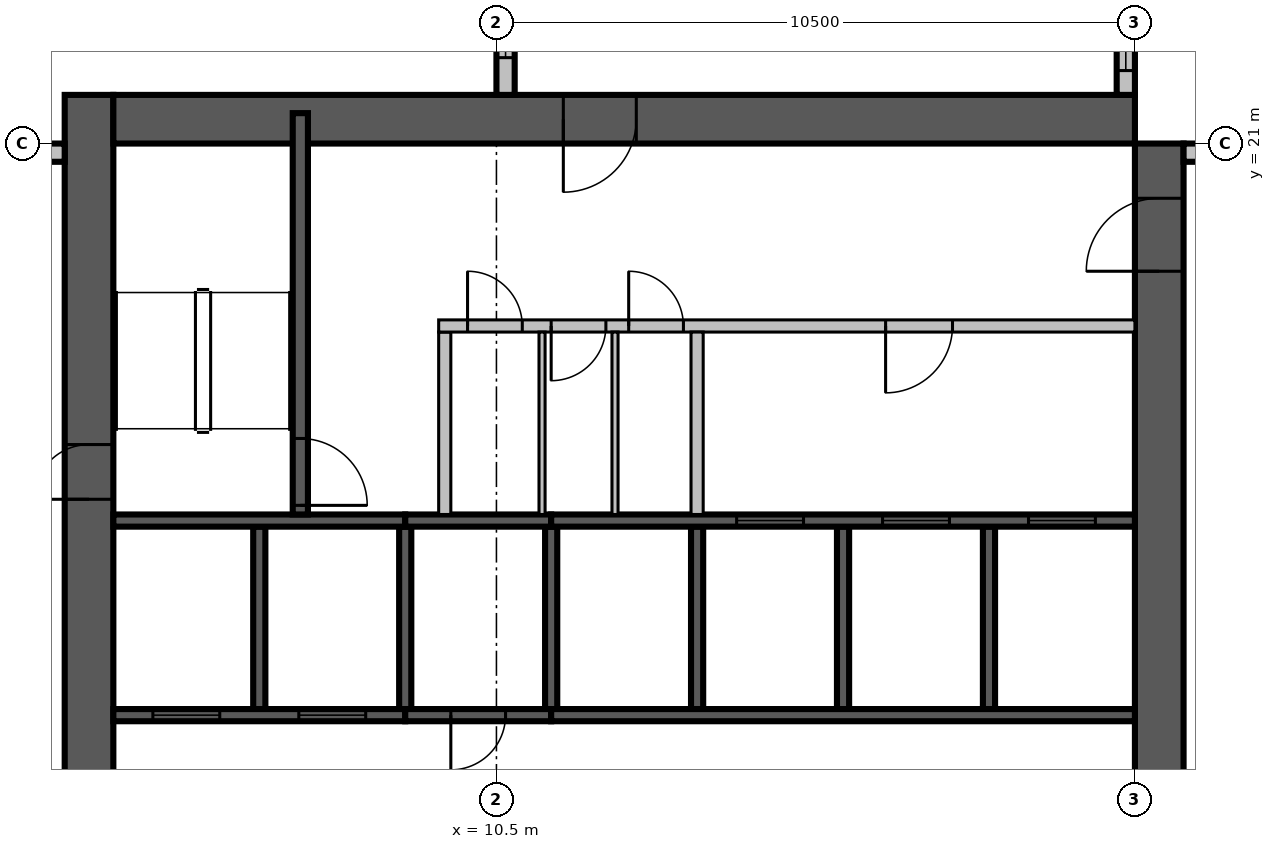
"""IFC4 building model, lengths in metres.
Left out: names, types, materials, properties, quantities, classifications, styles, units other than length and angle.
Written with IfcOpenShell. Run it as: python <this file> out.ifc"""

import sys

from ifc_helpers import new_model, si_unit, direction, frame, frame_2d, origin, place, context, subcontext, project, spatial, rectangle, extrude, source, transform, mapped, element, fill, save


model = new_model("IFC4")
c1 = context("Model", 3, precision=1e-05, world=origin(), true_north=direction((0.0, 1.0)))
c2 = subcontext(c1, "Body", "Model", "MODEL_VIEW")
j1 = project(units=[si_unit("LENGTHUNIT", "METRE"), si_unit("PLANEANGLEUNIT", "RADIAN")], contexts=[c1])
p1 = place(None, origin())
s1 = spatial("IfcSite", under=j1, at=p1, CompositionType="ELEMENT")
p2 = place(p1, origin())
s2 = spatial("IfcBuilding", under=s1, at=p2, CompositionType="ELEMENT")
p3 = place(p2, frame((0.0, 0.0, 238.6)))
s3 = spatial("IfcBuildingStorey", under=s2, at=p3, CompositionType="ELEMENT", Elevation=238.6)
m1 = source(origin(), c2, "Body", "SweptSolid", [
    extrude(rectangle(XDim=17.6, YDim=0.8, at=frame_2d((8.8, 0.0))), origin(), (0.0, 0.0, 1.0), 3.8),
])
p4 = place(p3, frame((3.8, 4.2, 0.0), z_axis=(0.0, 0.0, 1.0), x_axis=(0.0, 1.0, 0.0)))
e1 = element("IfcWall", 1, at=p4, inside=s3, PredefinedType="SHEAR", context=c2, shape_type="MappedRepresentation", body=[
    mapped(m1, transform((0.0, 0.0, 0.0), scale=1.0)),
])
m2 = source(origin(), c2, "Body", "SweptSolid", [
    extrude(rectangle(XDim=2.2, YDim=2.1, at=frame_2d((1.1, 1.05))), frame((0.0, 0.41, 0.0), z_axis=(0.0, -1.0, 0.0), x_axis=(1.0, 0.0, 0.0)), (0.0, 0.0, 1.0), 0.82),
])
p5 = place(p4, frame((4.2, 0.0, 0.0)))
e2 = element("IfcOpeningElement", 2, at=p5, cuts=e1, PredefinedType="OPENING", context=c2, shape_type="MappedRepresentation", body=[
    mapped(m2, transform((0.0, 0.0, 0.0), scale=1.0)),
])
m3 = source(origin(), c2, "Body", "SweptSolid", [
    extrude(rectangle(XDim=0.9, YDim=2.1, at=frame_2d((0.45, 1.05))), frame((0.0, 0.41, 0.0), z_axis=(0.0, -1.0, 0.0), x_axis=(1.0, 0.0, 0.0)), (0.0, 0.0, 1.0), 0.82),
])
p6 = place(p4, frame((10.95, 0.0, 0.0)))
e3 = element("IfcOpeningElement", 3, at=p6, cuts=e1, PredefinedType="OPENING", context=c2, shape_type="MappedRepresentation", body=[
    mapped(m3, transform((0.0, 0.0, 0.0), scale=1.0)),
])
m4 = source(origin(), c2, "Body", "SweptSolid", [
    extrude(rectangle(XDim=16.8, YDim=0.8, at=frame_2d((8.4, 0.0))), origin(), (0.0, 0.0, 1.0), 3.8),
])
p7 = place(p3, frame((21.4, 4.2, 0.0), z_axis=(0.0, 0.0, 1.0), x_axis=(0.0, 1.0, 0.0)))
e4 = element("IfcWall", 4, at=p7, inside=s3, PredefinedType="SHEAR", context=c2, shape_type="MappedRepresentation", body=[
    mapped(m4, transform((0.0, 0.0, 0.0), scale=1.0)),
])
p8 = place(p7, frame((4.2, 0.0, 0.0)))
e5 = element("IfcOpeningElement", 5, at=p8, cuts=e4, PredefinedType="OPENING", context=c2, shape_type="MappedRepresentation", body=[
    mapped(m2, transform((0.0, 0.0, 0.0), scale=1.0)),
])
m5 = source(origin(), c2, "Body", "SweptSolid", [
    extrude(rectangle(XDim=1.2, YDim=2.1, at=frame_2d((0.6, 1.05))), frame((0.0, 0.41, 0.0), z_axis=(0.0, -1.0, 0.0), x_axis=(1.0, 0.0, 0.0)), (0.0, 0.0, 1.0), 0.82),
])
p9 = place(p7, frame((14.7, 0.0, 0.0)))
e6 = element("IfcOpeningElement", 6, at=p9, cuts=e4, PredefinedType="OPENING", context=c2, shape_type="MappedRepresentation", body=[
    mapped(m5, transform((0.0, 0.0, 0.0), scale=1.0)),
])
p10 = place(p3, frame((4.2, 21.4, 0.0), z_axis=(0.0, 0.0, 1.0), x_axis=(1.0, 0.0, 0.0)))
e7 = element("IfcWall", 7, at=p10, inside=s3, PredefinedType="SHEAR", context=c2, shape_type="MappedRepresentation", body=[
    mapped(m4, transform((0.0, 0.0, 0.0), scale=1.0)),
])
p11 = place(p10, frame((7.4, 0.0, 0.0)))
e8 = element("IfcOpeningElement", 8, at=p11, cuts=e7, PredefinedType="OPENING", context=c2, shape_type="MappedRepresentation", body=[
    mapped(m5, transform((0.0, 0.0, 0.0), scale=1.0)),
])
m6 = source(origin(), c2, "Body", "SweptSolid", [
    extrude(rectangle(XDim=7.2, YDim=0.3, at=frame_2d((3.6, 0.0))), origin(), (0.0, 0.0, 1.0), 3.4),
])
p12 = place(p3, frame((29.0, 20.85, 0.0), z_axis=(0.0, 0.0, 1.0), x_axis=(-1.0, 0.0, 0.0)))
e9 = element("IfcWall", 9, at=p12, inside=s3, PredefinedType="STANDARD", context=c2, shape_type="MappedRepresentation", body=[
    mapped(m6, transform((0.0, 0.0, 0.0), scale=1.0)),
])
m7 = source(origin(), c2, "Body", "SweptSolid", [
    extrude(rectangle(XDim=3.0, YDim=2.3, at=frame_2d((1.5, 1.15))), frame((0.0, 0.16, 0.0), z_axis=(0.0, -1.0, 0.0), x_axis=(1.0, 0.0, 0.0)), (0.0, 0.0, 1.0), 0.32),
])
p13 = place(p12, frame((0.2, 0.0, 0.6)))
e10 = element("IfcOpeningElement", 10, at=p13, cuts=e9, PredefinedType="OPENING", context=c2, shape_type="MappedRepresentation", body=[
    mapped(m7, transform((0.0, 0.0, 0.0), scale=1.0)),
])
m8 = source(origin(), c2, "Body", "SweptSolid", [
    extrude(rectangle(XDim=1.8, YDim=2.3, at=frame_2d((0.9, 1.15))), frame((0.0, 0.16, 0.0), z_axis=(0.0, -1.0, 0.0), x_axis=(1.0, 0.0, 0.0)), (0.0, 0.0, 1.0), 0.32),
])
p14 = place(p12, frame((5.0, 0.0, 0.6)))
e11 = element("IfcOpeningElement", 11, at=p14, cuts=e9, PredefinedType="OPENING", context=c2, shape_type="MappedRepresentation", body=[
    mapped(m8, transform((0.0, 0.0, 0.0), scale=1.0)),
])
p15 = place(p3, frame((20.85, 21.8, 0.0), z_axis=(0.0, 0.0, 1.0), x_axis=(0.0, 1.0, 0.0)))
e12 = element("IfcWall", 12, at=p15, inside=s3, PredefinedType="STANDARD", context=c2, shape_type="MappedRepresentation", body=[
    mapped(m6, transform((0.0, 0.0, 0.0), scale=1.0)),
])
p16 = place(p15, frame((0.4, 0.0, 0.6)))
e13 = element("IfcOpeningElement", 13, at=p16, cuts=e12, PredefinedType="OPENING", context=c2, shape_type="MappedRepresentation", body=[
    mapped(m8, transform((0.0, 0.0, 0.0), scale=1.0)),
])
p17 = place(p15, frame((4.0, 0.0, 0.6)))
e14 = element("IfcOpeningElement", 14, at=p17, cuts=e12, PredefinedType="OPENING", context=c2, shape_type="MappedRepresentation", body=[
    mapped(m7, transform((0.0, 0.0, 0.0), scale=1.0)),
])
p18 = place(p3, frame((10.65, 29.0, 0.0), z_axis=(0.0, 0.0, 1.0), x_axis=(0.0, -1.0, 0.0)))
e15 = element("IfcWall", 15, at=p18, inside=s3, PredefinedType="STANDARD", context=c2, shape_type="MappedRepresentation", body=[
    mapped(m6, transform((0.0, 0.0, 0.0), scale=1.0)),
])
p19 = place(p18, frame((0.2, 0.0, 0.6)))
e16 = element("IfcOpeningElement", 16, at=p19, cuts=e15, PredefinedType="OPENING", context=c2, shape_type="MappedRepresentation", body=[
    mapped(m8, transform((0.0, 0.0, 0.0), scale=1.0)),
])
m9 = source(origin(), c2, "Body", "SweptSolid", [
    extrude(rectangle(XDim=2.4, YDim=2.3, at=frame_2d((1.2, 1.15))), frame((0.0, 0.16, 0.0), z_axis=(0.0, -1.0, 0.0), x_axis=(1.0, 0.0, 0.0)), (0.0, 0.0, 1.0), 0.32),
])
p20 = place(p18, frame((4.188, 0.0, 0.6)))
e17 = element("IfcOpeningElement", 17, at=p20, cuts=e15, PredefinedType="OPENING", context=c2, shape_type="MappedRepresentation", body=[
    mapped(m9, transform((0.0, 0.0, 0.0), scale=1.0)),
])
m10 = source(origin(), c2, "Body", "SweptSolid", [
    extrude(rectangle(XDim=2.6, YDim=0.3, at=frame_2d((1.3, 0.0))), origin(), (0.0, 0.0, 1.0), 3.4),
])
p21 = place(p3, frame((3.4, 20.85, 0.0), z_axis=(0.0, 0.0, 1.0), x_axis=(-1.0, 0.0, 0.0)))
e18 = element("IfcWall", 18, at=p21, inside=s3, PredefinedType="STANDARD", context=c2, shape_type="MappedRepresentation", body=[
    mapped(m10, transform((0.0, 0.0, 0.0), scale=1.0)),
])
p22 = place(p21, frame((0.4, 0.0, 0.6)))
e19 = element("IfcOpeningElement", 19, at=p22, cuts=e18, PredefinedType="OPENING", context=c2, shape_type="MappedRepresentation", body=[
    mapped(m8, transform((0.0, 0.0, 0.0), scale=1.0)),
])
m11 = source(origin(), c2, "Body", "SweptSolid", [
    extrude(rectangle(XDim=3.0, YDim=0.2, at=frame_2d((1.5, 0.0))), origin(), (0.0, 0.0, 1.0), 3.8),
])
p23 = place(p3, frame((6.6, 11.7, 0.0), z_axis=(0.0, 0.0, 1.0), x_axis=(0.0, 1.0, 0.0)))
e20 = element("IfcWall", 20, at=p23, inside=s3, PredefinedType="SOLIDWALL", context=c2, shape_type="MappedRepresentation", body=[
    mapped(m11, transform((0.0, 0.0, 0.0), scale=1.0)),
])
m12 = source(origin(), c2, "Body", "SweptSolid", [
    extrude(rectangle(XDim=3.0, YDim=0.2, at=frame_2d((1.5, 0.0))), origin(), (0.0, 0.0, 1.0), 3.4),
])
for number, where, z_axis, x_axis in (
    (21, (9.0, 11.7, 0.0), (0.0, 0.0, 1.0), (0.0, 1.0, 0.0)),
    (22, (11.4, 11.7, 0.0), (0.0, 0.0, 1.0), (0.0, 1.0, 0.0)),
):
    element("IfcWall", number, at=place(p3, frame(where, z_axis=z_axis, x_axis=x_axis)), inside=s3, PredefinedType="SOLIDWALL", context=c2, shape_type="MappedRepresentation", body=[
        mapped(m12, transform((0.0, 0.0, 0.0), scale=1.0)),
    ])
for number, where, z_axis, x_axis in (
    (23, (13.8, 11.7, 0.0), (0.0, 0.0, 1.0), (0.0, 1.0, 0.0)),
    (24, (16.2, 11.7, 0.0), (0.0, 0.0, 1.0), (0.0, 1.0, 0.0)),
    (25, (18.6, 11.7, 0.0), (0.0, 0.0, 1.0), (0.0, 1.0, 0.0)),
):
    element("IfcWall", number, at=place(p3, frame(where, z_axis=z_axis, x_axis=x_axis)), inside=s3, PredefinedType="SOLIDWALL", context=c2, shape_type="MappedRepresentation", body=[
        mapped(m11, transform((0.0, 0.0, 0.0), scale=1.0)),
    ])
m13 = source(origin(), c2, "Body", "SweptSolid", [
    extrude(rectangle(XDim=4.8, YDim=0.2, at=frame_2d((2.4, 0.0))), origin(), (0.0, 0.0, 1.0), 3.8),
])
p24 = place(p3, frame((4.2, 11.6, 0.0), z_axis=(0.0, 0.0, 1.0), x_axis=(1.0, 0.0, 0.0)))
e26 = element("IfcWall", 26, at=p24, inside=s3, PredefinedType="SOLIDWALL", context=c2, shape_type="MappedRepresentation", body=[
    mapped(m13, transform((0.0, 0.0, 0.0), scale=1.0)),
])
m14 = source(origin(), c2, "Body", "SweptSolid", [
    extrude(rectangle(XDim=1.1, YDim=2.1, at=frame_2d((0.55, 1.05))), frame((0.0, 0.11, 0.0), z_axis=(0.0, -1.0, 0.0), x_axis=(1.0, 0.0, 0.0)), (0.0, 0.0, 1.0), 0.22),
])
p25 = place(p24, frame((0.65, 0.0, 0.0)))
e27 = element("IfcOpeningElement", 27, at=p25, cuts=e26, PredefinedType="OPENING", context=c2, shape_type="MappedRepresentation", body=[
    mapped(m14, transform((0.0, 0.0, 0.0), scale=1.0)),
])
p26 = place(p24, frame((3.05, 0.0, 0.0)))
e28 = element("IfcOpeningElement", 28, at=p26, cuts=e26, PredefinedType="OPENING", context=c2, shape_type="MappedRepresentation", body=[
    mapped(m14, transform((0.0, 0.0, 0.0), scale=1.0)),
])
m15 = source(origin(), c2, "Body", "SweptSolid", [
    extrude(rectangle(XDim=2.4, YDim=0.2, at=frame_2d((1.2, 0.0))), origin(), (0.0, 0.0, 1.0), 3.4),
])
p27 = place(p3, frame((9.0, 11.6, 0.0), z_axis=(0.0, 0.0, 1.0), x_axis=(1.0, 0.0, 0.0)))
e29 = element("IfcWall", 29, at=p27, inside=s3, PredefinedType="SOLIDWALL", context=c2, shape_type="MappedRepresentation", body=[
    mapped(m15, transform((0.0, 0.0, 0.0), scale=1.0)),
])
m16 = source(origin(), c2, "Body", "SweptSolid", [
    extrude(rectangle(XDim=0.9, YDim=2.1, at=frame_2d((0.45, 1.05))), frame((0.0, 0.11, 0.0), z_axis=(0.0, -1.0, 0.0), x_axis=(1.0, 0.0, 0.0)), (0.0, 0.0, 1.0), 0.22),
])
p28 = place(p27, frame((0.75, 0.0, 0.0)))
e30 = element("IfcOpeningElement", 30, at=p28, cuts=e29, PredefinedType="OPENING", context=c2, shape_type="MappedRepresentation", body=[
    mapped(m16, transform((0.0, 0.0, 0.0), scale=1.0)),
])
m17 = source(origin(), c2, "Body", "SweptSolid", [
    extrude(rectangle(XDim=9.6, YDim=0.2, at=frame_2d((4.8, 0.0))), origin(), (0.0, 0.0, 1.0), 3.8),
])
p29 = place(p3, frame((11.4, 11.6, 0.0), z_axis=(0.0, 0.0, 1.0), x_axis=(1.0, 0.0, 0.0)))
e31 = element("IfcWall", 31, at=p29, inside=s3, PredefinedType="SOLIDWALL", context=c2, shape_type="MappedRepresentation", body=[
    mapped(m17, transform((0.0, 0.0, 0.0), scale=1.0)),
])
p30 = place(p3, frame((4.2, 14.8, 0.0), z_axis=(0.0, 0.0, 1.0), x_axis=(1.0, 0.0, 0.0)))
e32 = element("IfcWall", 32, at=p30, inside=s3, PredefinedType="SOLIDWALL", context=c2, shape_type="MappedRepresentation", body=[
    mapped(m13, transform((0.0, 0.0, 0.0), scale=1.0)),
])
p31 = place(p3, frame((9.0, 14.8, 0.0), z_axis=(0.0, 0.0, 1.0), x_axis=(1.0, 0.0, 0.0)))
e33 = element("IfcWall", 33, at=p31, inside=s3, PredefinedType="SOLIDWALL", context=c2, shape_type="MappedRepresentation", body=[
    mapped(m15, transform((0.0, 0.0, 0.0), scale=1.0)),
])
p32 = place(p3, frame((11.4, 14.8, 0.0), z_axis=(0.0, 0.0, 1.0), x_axis=(1.0, 0.0, 0.0)))
e34 = element("IfcWall", 34, at=p32, inside=s3, PredefinedType="SOLIDWALL", context=c2, shape_type="MappedRepresentation", body=[
    mapped(m17, transform((0.0, 0.0, 0.0), scale=1.0)),
])
p33 = place(p32, frame((3.05, 0.0, 0.0)))
e35 = element("IfcOpeningElement", 35, at=p33, cuts=e34, PredefinedType="OPENING", context=c2, shape_type="MappedRepresentation", body=[
    mapped(m14, transform((0.0, 0.0, 0.0), scale=1.0)),
])
p34 = place(p32, frame((5.45, 0.0, 0.0)))
e36 = element("IfcOpeningElement", 36, at=p34, cuts=e34, PredefinedType="OPENING", context=c2, shape_type="MappedRepresentation", body=[
    mapped(m14, transform((0.0, 0.0, 0.0), scale=1.0)),
])
p35 = place(p32, frame((7.85, 0.0, 0.0)))
e37 = element("IfcOpeningElement", 37, at=p35, cuts=e34, PredefinedType="OPENING", context=c2, shape_type="MappedRepresentation", body=[
    mapped(m14, transform((0.0, 0.0, 0.0), scale=1.0)),
])
m18 = source(origin(), c2, "Body", "SweptSolid", [
    extrude(rectangle(XDim=6.6, YDim=0.25, at=frame_2d((3.3, 0.0))), origin(), (0.0, 0.0, 1.0), 3.4),
])
p36 = place(p3, frame((7.275, 14.9, 0.0), z_axis=(0.0, 0.0, 1.0), x_axis=(0.0, 1.0, 0.0)))
e38 = element("IfcWall", 38, at=p36, inside=s3, PredefinedType="SOLIDWALL", context=c2, shape_type="MappedRepresentation", body=[
    mapped(m18, transform((0.0, 0.0, 0.0), scale=1.0)),
])
m19 = source(origin(), c2, "Body", "SweptSolid", [
    extrude(rectangle(XDim=1.1, YDim=2.1, at=frame_2d((0.55, 1.05))), frame((0.0, 0.135, 0.0), z_axis=(0.0, -1.0, 0.0), x_axis=(1.0, 0.0, 0.0)), (0.0, 0.0, 1.0), 0.27),
])
p37 = place(p36, frame((0.15, 0.0, 0.0)))
e39 = element("IfcOpeningElement", 39, at=p37, cuts=e38, PredefinedType="OPENING", context=c2, shape_type="MappedRepresentation", body=[
    mapped(m19, transform((0.0, 0.0, 0.0), scale=1.0)),
])
m20 = source(origin(), c2, "Body", "SweptSolid", [
    extrude(rectangle(XDim=3.0, YDim=0.2, at=frame_2d((1.5, 0.0))), origin(), (0.0, 0.0, 1.0), 3.4),
])
p38 = place(p3, frame((9.65, 14.9, 0.0), z_axis=(0.0, 0.0, 1.0), x_axis=(0.0, 1.0, 0.0)))
e40 = element("IfcWall", 40, at=p38, inside=s3, PredefinedType="PARTITIONING", context=c2, shape_type="MappedRepresentation", body=[
    mapped(m20, transform((0.0, 0.0, 0.0), scale=1.0)),
])
m21 = source(origin(), c2, "Body", "SweptSolid", [
    extrude(rectangle(XDim=11.45, YDim=0.2, at=frame_2d((5.725, 0.0))), origin(), (0.0, 0.0, 1.0), 3.4),
])
p39 = place(p3, frame((9.55, 18.0, 0.0), z_axis=(0.0, 0.0, 1.0), x_axis=(1.0, 0.0, 0.0)))
e41 = element("IfcWall", 41, at=p39, inside=s3, PredefinedType="PARTITIONING", context=c2, shape_type="MappedRepresentation", body=[
    mapped(m21, transform((0.0, 0.0, 0.0), scale=1.0)),
])
p40 = place(p39, frame((0.475, 0.0, 0.0)))
e42 = element("IfcOpeningElement", 42, at=p40, cuts=e41, PredefinedType="OPENING", context=c2, shape_type="MappedRepresentation", body=[
    mapped(m16, transform((0.0, 0.0, 0.0), scale=1.0)),
])
p41 = place(p39, frame((1.85, 0.0, 0.0)))
e43 = element("IfcOpeningElement", 43, at=p41, cuts=e41, PredefinedType="OPENING", context=c2, shape_type="MappedRepresentation", body=[
    mapped(m16, transform((0.0, 0.0, 0.0), scale=1.0)),
])
p42 = place(p39, frame((3.125, 0.0, 0.0)))
e44 = element("IfcOpeningElement", 44, at=p42, cuts=e41, PredefinedType="OPENING", context=c2, shape_type="MappedRepresentation", body=[
    mapped(m16, transform((0.0, 0.0, 0.0), scale=1.0)),
])
p43 = place(p39, frame((7.35, 0.0, 0.0)))
e45 = element("IfcOpeningElement", 45, at=p43, cuts=e41, PredefinedType="OPENING", context=c2, shape_type="MappedRepresentation", body=[
    mapped(m14, transform((0.0, 0.0, 0.0), scale=1.0)),
])
p44 = place(p3, frame((13.8, 14.9, 0.0), z_axis=(0.0, 0.0, 1.0), x_axis=(0.0, 1.0, 0.0)))
e46 = element("IfcWall", 46, at=p44, inside=s3, PredefinedType="PARTITIONING", context=c2, shape_type="MappedRepresentation", body=[
    mapped(m20, transform((0.0, 0.0, 0.0), scale=1.0)),
])
m22 = source(origin(), c2, "Body", "SweptSolid", [
    extrude(rectangle(XDim=3.0, YDim=0.1, at=frame_2d((1.5, 0.0))), origin(), (0.0, 0.0, 1.0), 3.4),
])
for number, where, z_axis, x_axis in (
    (47, (11.25, 14.9, 0.0), (0.0, 0.0, 1.0), (0.0, 1.0, 0.0)),
    (48, (12.45, 14.9, 0.0), (0.0, 0.0, 1.0), (0.0, 1.0, 0.0)),
):
    element("IfcWall", number, at=place(p3, frame(where, z_axis=z_axis, x_axis=x_axis)), inside=s3, PredefinedType="PARTITIONING", context=c2, shape_type="MappedRepresentation", body=[
        mapped(m22, transform((0.0, 0.0, 0.0), scale=1.0)),
    ])
m23 = source(origin(), c2, "Body", "SweptSolid", [
    extrude(rectangle(XDim=1.8, YDim=2.3, at=frame_2d((0.9, 1.15))), frame((0.0, 0.03, 0.0), z_axis=(0.0, -1.0, 0.0), x_axis=(1.0, 0.0, 0.0)), (0.0, 0.0, 1.0), 0.06),
])
p45 = place(p16, origin())
e49 = element("IfcWindow", 49, at=p45, inside=s3, PartitioningType="SINGLE_PANEL", PredefinedType="WINDOW", context=c2, shape_type="MappedRepresentation", body=[
    mapped(m23, transform((0.0, 0.0, 0.0), scale=1.0)),
])
fill(e13, e49)
m24 = source(origin(), c2, "Body", "SweptSolid", [
    extrude(rectangle(XDim=2.4, YDim=2.3, at=frame_2d((1.2, 1.15))), frame((0.0, 0.03, 0.0), z_axis=(0.0, -1.0, 0.0), x_axis=(1.0, 0.0, 0.0)), (0.0, 0.0, 1.0), 0.06),
])
p46 = place(p20, origin())
e50 = element("IfcWindow", 50, at=p46, inside=s3, PartitioningType="SINGLE_PANEL", PredefinedType="WINDOW", context=c2, shape_type="MappedRepresentation", body=[
    mapped(m24, transform((0.0, 0.0, 0.0), scale=1.0)),
])
fill(e17, e50)
m25 = source(origin(), c2, "Body", "SweptSolid", [
    extrude(rectangle(XDim=1.1, YDim=2.1, at=frame_2d((0.55, 1.05))), frame((0.0, 0.025, 0.0), z_axis=(0.0, -1.0, 0.0), x_axis=(1.0, 0.0, 0.0)), (0.0, 0.0, 1.0), 0.05),
])
p47 = place(p25, origin())
e51 = element("IfcDoor", 51, at=p47, inside=s3, OperationType="SLIDING_TO_LEFT", PredefinedType="DOOR", context=c2, shape_type="MappedRepresentation", body=[
    mapped(m25, transform((0.0, 0.0, 0.0), scale=1.0)),
])
fill(e27, e51)
p48 = place(p26, origin())
e52 = element("IfcDoor", 52, at=p48, inside=s3, OperationType="SLIDING_TO_LEFT", PredefinedType="DOOR", context=c2, shape_type="MappedRepresentation", body=[
    mapped(m25, transform((0.0, 0.0, 0.0), scale=1.0)),
])
fill(e28, e52)
m26 = source(origin(), c2, "Body", "SweptSolid", [
    extrude(rectangle(XDim=0.9, YDim=2.1, at=frame_2d((0.45, 1.05))), frame((0.0, 0.025, 0.0), z_axis=(0.0, -1.0, 0.0), x_axis=(1.0, 0.0, 0.0)), (0.0, 0.0, 1.0), 0.05),
])
p49 = place(p28, origin())
e53 = element("IfcDoor", 53, at=p49, inside=s3, OperationType="SINGLE_SWING_RIGHT", PredefinedType="DOOR", context=c2, shape_type="MappedRepresentation", body=[
    mapped(m26, transform((0.0, 0.0, 0.0), scale=1.0)),
])
fill(e30, e53)
p50 = place(p33, origin())
e54 = element("IfcDoor", 54, at=p50, inside=s3, OperationType="SLIDING_TO_LEFT", PredefinedType="DOOR", context=c2, shape_type="MappedRepresentation", body=[
    mapped(m25, transform((0.0, 0.0, 0.0), scale=1.0)),
])
fill(e35, e54)
p51 = place(p34, origin())
e55 = element("IfcDoor", 55, at=p51, inside=s3, OperationType="SLIDING_TO_LEFT", PredefinedType="DOOR", context=c2, shape_type="MappedRepresentation", body=[
    mapped(m25, transform((0.0, 0.0, 0.0), scale=1.0)),
])
fill(e36, e55)
p52 = place(p35, origin())
e56 = element("IfcDoor", 56, at=p52, inside=s3, OperationType="SLIDING_TO_LEFT", PredefinedType="DOOR", context=c2, shape_type="MappedRepresentation", body=[
    mapped(m25, transform((0.0, 0.0, 0.0), scale=1.0)),
])
fill(e37, e56)
p53 = place(p37, origin())
e57 = element("IfcDoor", 57, at=p53, inside=s3, OperationType="SINGLE_SWING_RIGHT", PredefinedType="DOOR", context=c2, shape_type="MappedRepresentation", body=[
    mapped(m25, transform((0.0, 0.0, 0.0), scale=1.0)),
])
fill(e39, e57)
p54 = place(p40, origin())
e58 = element("IfcDoor", 58, at=p54, inside=s3, OperationType="SINGLE_SWING_LEFT", PredefinedType="DOOR", context=c2, shape_type="MappedRepresentation", body=[
    mapped(m26, transform((0.0, 0.0, 0.0), scale=1.0)),
])
fill(e42, e58)
p55 = place(p41, origin())
e59 = element("IfcDoor", 59, at=p55, inside=s3, OperationType="SINGLE_SWING_RIGHT", PredefinedType="DOOR", context=c2, shape_type="MappedRepresentation", body=[
    mapped(m26, transform((0.0, 0.0, 0.0), scale=1.0)),
])
fill(e43, e59)
p56 = place(p42, origin())
e60 = element("IfcDoor", 60, at=p56, inside=s3, OperationType="SINGLE_SWING_LEFT", PredefinedType="DOOR", context=c2, shape_type="MappedRepresentation", body=[
    mapped(m26, transform((0.0, 0.0, 0.0), scale=1.0)),
])
fill(e44, e60)
p57 = place(p43, origin())
e61 = element("IfcDoor", 61, at=p57, inside=s3, OperationType="SINGLE_SWING_RIGHT", PredefinedType="DOOR", context=c2, shape_type="MappedRepresentation", body=[
    mapped(m25, transform((0.0, 0.0, 0.0), scale=1.0)),
])
fill(e45, e61)
m27 = source(origin(), c2, "Body", "SweptSolid", [
    extrude(rectangle(XDim=1.2, YDim=2.1, at=frame_2d((0.6, 1.05))), frame((0.0, 0.025, 0.0), z_axis=(0.0, -1.0, 0.0), x_axis=(1.0, 0.0, 0.0)), (0.0, 0.0, 1.0), 0.05),
])
p58 = place(p11, origin())
e62 = element("IfcDoor", 62, at=p58, inside=s3, OperationType="SINGLE_SWING_RIGHT", PredefinedType="DOOR", context=c2, shape_type="MappedRepresentation", body=[
    mapped(m27, transform((0.0, 0.0, 0.0), scale=1.0)),
])
fill(e8, e62)
p59 = place(p9, origin())
e63 = element("IfcDoor", 63, at=p59, inside=s3, OperationType="SINGLE_SWING_LEFT", PredefinedType="DOOR", context=c2, shape_type="MappedRepresentation", body=[
    mapped(m27, transform((0.0, 0.0, 0.0), scale=1.0)),
])
fill(e6, e63)
p60 = place(p6, origin())
e64 = element("IfcDoor", 64, at=p60, inside=s3, OperationType="SINGLE_SWING_LEFT", PredefinedType="DOOR", context=c2, shape_type="MappedRepresentation", body=[
    mapped(m26, transform((0.0, 0.0, 0.0), scale=1.0)),
])
fill(e3, e64)
save(model, sys.argv[1])
